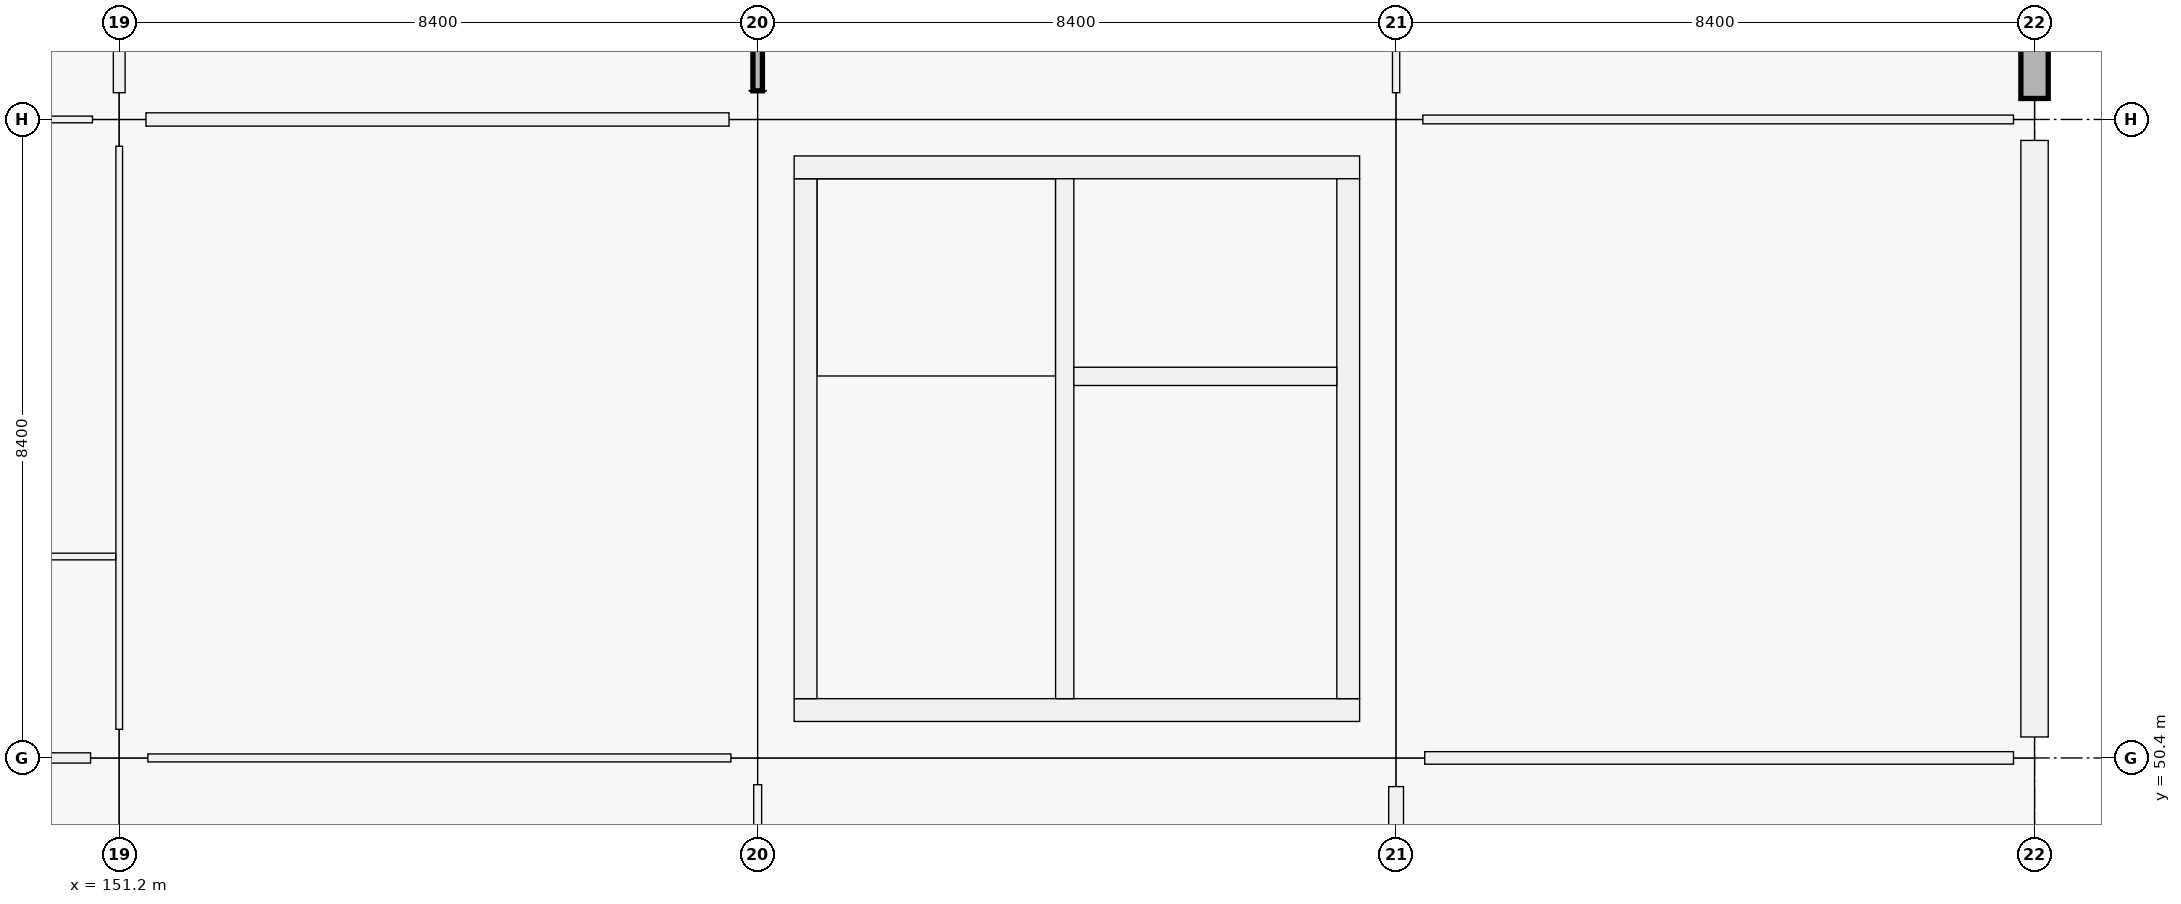
"""IFC4 building model, lengths in metres.
Left out: names, types, materials, properties, quantities, classifications, styles, units other than length and angle.
Written with IfcOpenShell. Run it as: python <this file> out.ifc"""

import sys

from ifc_helpers import new_model, si_unit, direction, frame, frame_2d, origin, origin_2d, place, context, subcontext, project, spatial, rectangle, extrude, element, fill, save


model = new_model("IFC4")
c1 = context("Model", 3, precision=1e-05, world=origin(), true_north=direction((0.0, 1.0)))
c2 = subcontext(c1, "Body", "Model", "MODEL_VIEW")
j1 = project(units=[si_unit("LENGTHUNIT", "METRE"), si_unit("PLANEANGLEUNIT", "RADIAN")], contexts=[c1])
p1 = place(None, origin())
s1 = spatial("IfcSite", under=j1, at=p1, CompositionType="ELEMENT")
p2 = place(p1, origin())
s2 = spatial("IfcBuilding", under=s1, at=p2, CompositionType="ELEMENT")
p3 = place(p2, frame((0.0, 0.0, 5.76)))
s3 = spatial("IfcBuildingStorey", under=s2, at=p3, CompositionType="ELEMENT", Elevation=5.76)
p4 = place(p3, frame((151.2, 50.4, 0.0), z_axis=(0.0, 0.0, 1.0), x_axis=(1.0, 0.0, 0.0)))
e1 = element("IfcColumn", 1, at=p4, inside=s3, PredefinedType="COLUMN", context=c2, shape_type="SweptSolid", body=[
    extrude(rectangle(XDim=0.75, YDim=0.75, at=origin_2d()), origin(), (0.0, 0.0, 1.0), 4.5),
])
for number, where, z_axis, x_axis in (
    (2, (151.2, 58.8, 0.0), (0.0, 0.0, 1.0), (1.0, 0.0, 0.0)),
    (3, (159.6, 50.4, 0.0), (0.0, 0.0, 1.0), (1.0, 0.0, 0.0)),
):
    element("IfcColumn", number, at=place(p3, frame(where, z_axis=z_axis, x_axis=x_axis)), inside=s3, PredefinedType="COLUMN", context=c2, shape_type="SweptSolid", body=[
        extrude(rectangle(XDim=0.7, YDim=0.7, at=origin_2d()), origin(), (0.0, 0.0, 1.0), 4.5),
    ])
for number, where, z_axis, x_axis in (
    (4, (159.6, 58.8, 0.0), (0.0, 0.0, 1.0), (1.0, 0.0, 0.0)),
    (5, (168.0, 50.4, 0.0), (0.0, 0.0, 1.0), (1.0, 0.0, 0.0)),
):
    element("IfcColumn", number, at=place(p3, frame(where, z_axis=z_axis, x_axis=x_axis)), inside=s3, PredefinedType="COLUMN", context=c2, shape_type="SweptSolid", body=[
        extrude(rectangle(XDim=0.75, YDim=0.75, at=origin_2d()), origin(), (0.0, 0.0, 1.0), 4.5),
    ])
p5 = place(p3, frame((168.0, 58.8, 0.0), z_axis=(0.0, 0.0, 1.0), x_axis=(1.0, 0.0, 0.0)))
e6 = element("IfcColumn", 6, at=p5, inside=s3, PredefinedType="COLUMN", context=c2, shape_type="SweptSolid", body=[
    extrude(rectangle(XDim=0.7, YDim=0.7, at=origin_2d()), origin(), (0.0, 0.0, 1.0), 4.5),
])
for number, where, z_axis, x_axis in (
    (7, (176.4, 50.4, 0.0), (0.0, 0.0, 1.0), (1.0, 0.0, 0.0)),
    (8, (176.4, 58.8, 0.0), (0.0, 0.0, 1.0), (1.0, 0.0, 0.0)),
):
    element("IfcColumn", number, at=place(p3, frame(where, z_axis=z_axis, x_axis=x_axis)), inside=s3, PredefinedType="COLUMN", context=c2, shape_type="SweptSolid", body=[
        extrude(rectangle(XDim=0.55, YDim=0.55, at=origin_2d()), origin(), (0.0, 0.0, 1.0), 4.2),
    ])
p6 = place(p3, frame((176.4, 58.524, 0.0), z_axis=(0.0, 0.0, 1.0), x_axis=(0.0, -1.0, 0.0)))
e9 = element("IfcWall", 9, at=p6, inside=s3, PredefinedType="SOLIDWALL", context=c2, shape_type="SweptSolid", body=[
    extrude(rectangle(XDim=7.848, YDim=0.36, at=frame_2d((3.924, 0.0))), origin(), (0.0, 0.0, 1.0), 3.4),
])
p7 = place(p6, frame((2.749, 0.0, 0.9)))
e10 = element("IfcOpeningElement", 10, at=p7, cuts=e9, PredefinedType="OPENING", context=c2, shape_type="SweptSolid", body=[
    extrude(rectangle(XDim=2.35, YDim=1.6, at=frame_2d((1.175, 0.8))), frame((0.0, 0.18, 0.0), z_axis=(0.0, -1.0, 0.0), x_axis=(1.0, 0.0, 0.0)), (0.0, 0.0, 1.0), 0.36),
])
p8 = place(p3, frame((176.4, 66.924, 0.0), z_axis=(0.0, 0.0, 1.0), x_axis=(0.0, -1.0, 0.0)))
e11 = element("IfcWall", 11, at=p8, inside=s3, PredefinedType="SOLIDWALL", context=c2, shape_type="SweptSolid", body=[
    extrude(rectangle(XDim=7.848, YDim=0.36, at=frame_2d((3.924, 0.0))), origin(), (0.0, 0.0, 1.0), 3.4),
])
p9 = place(p8, frame((2.549, 0.0, 0.9)))
e12 = element("IfcOpeningElement", 12, at=p9, cuts=e11, PredefinedType="OPENING", context=c2, shape_type="SweptSolid", body=[
    extrude(rectangle(XDim=2.75, YDim=1.6, at=frame_2d((1.375, 0.8))), frame((0.0, 0.18, 0.0), z_axis=(0.0, -1.0, 0.0), x_axis=(1.0, 0.0, 0.0)), (0.0, 0.0, 1.0), 0.36),
])
p10 = place(p3, frame((167.52, 51.03, 0.0), z_axis=(0.0, 0.0, 1.0), x_axis=(-1.0, 0.0, 0.0)))
e13 = element("IfcWall", 13, at=p10, inside=s3, PredefinedType="SHEAR", context=c2, shape_type="SweptSolid", body=[
    extrude(rectangle(XDim=7.44, YDim=0.3, at=frame_2d((3.72, 0.0))), origin(), (0.0, 0.0, 1.0), 4.5),
])
p11 = place(p10, frame((1.28, 0.0, 0.0)))
e14 = element("IfcOpeningElement", 14, at=p11, cuts=e13, PredefinedType="OPENING", context=c2, shape_type="SweptSolid", body=[
    extrude(rectangle(XDim=1.5, YDim=2.15, at=frame_2d((0.75, 1.075))), frame((0.0, 0.15, 0.0), z_axis=(0.0, -1.0, 0.0), x_axis=(1.0, 0.0, 0.0)), (0.0, 0.0, 1.0), 0.3),
])
p12 = place(p3, frame((160.23, 51.18, 0.0), z_axis=(0.0, 0.0, 1.0), x_axis=(0.0, 1.0, 0.0)))
e15 = element("IfcWall", 15, at=p12, inside=s3, PredefinedType="SHEAR", context=c2, shape_type="SweptSolid", body=[
    extrude(rectangle(XDim=6.84, YDim=0.3, at=frame_2d((3.42, 0.0))), origin(), (0.0, 0.0, 1.0), 4.5),
])
p13 = place(p3, frame((160.08, 58.17, 0.0), z_axis=(0.0, 0.0, 1.0), x_axis=(1.0, 0.0, 0.0)))
e16 = element("IfcWall", 16, at=p13, inside=s3, PredefinedType="SHEAR", context=c2, shape_type="SweptSolid", body=[
    extrude(rectangle(XDim=7.44, YDim=0.3, at=frame_2d((3.72, 0.0))), origin(), (0.0, 0.0, 1.0), 4.5),
])
p14 = place(p3, frame((167.37, 58.02, 0.0), z_axis=(0.0, 0.0, 1.0), x_axis=(0.0, -1.0, 0.0)))
e17 = element("IfcWall", 17, at=p14, inside=s3, PredefinedType="SHEAR", context=c2, shape_type="SweptSolid", body=[
    extrude(rectangle(XDim=6.84, YDim=0.3, at=frame_2d((3.42, 0.0))), origin(), (0.0, 0.0, 1.0), 4.5),
])
p15 = place(p3, frame((163.64, 51.18, 0.0), z_axis=(0.0, 0.0, 1.0), x_axis=(0.0, 1.0, 0.0)))
e18 = element("IfcWall", 18, at=p15, inside=s3, PredefinedType="SHEAR", context=c2, shape_type="SweptSolid", body=[
    extrude(rectangle(XDim=6.84, YDim=0.24, at=frame_2d((3.42, 0.0))), origin(), (0.0, 0.0, 1.0), 4.5),
])
p16 = place(p15, frame((0.12, 0.0, 0.0)))
e19 = element("IfcOpeningElement", 19, at=p16, cuts=e18, PredefinedType="OPENING", context=c2, shape_type="SweptSolid", body=[
    extrude(rectangle(XDim=1.0, YDim=2.15, at=frame_2d((0.5, 1.075))), frame((0.0, 0.12, 0.0), z_axis=(0.0, -1.0, 0.0), x_axis=(1.0, 0.0, 0.0)), (0.0, 0.0, 1.0), 0.24),
])
p17 = place(p3, frame((163.76, 55.42, 0.0), z_axis=(0.0, 0.0, 1.0), x_axis=(1.0, 0.0, 0.0)))
e20 = element("IfcWall", 20, at=p17, inside=s3, PredefinedType="SHEAR", context=c2, shape_type="SweptSolid", body=[
    extrude(rectangle(XDim=3.46, YDim=0.24, at=frame_2d((1.73, 0.0))), origin(), (0.0, 0.0, 1.0), 4.5),
])
p18 = place(p17, frame((1.08, 0.0, 0.0)))
e21 = element("IfcOpeningElement", 21, at=p18, cuts=e20, PredefinedType="OPENING", context=c2, shape_type="SweptSolid", body=[
    extrude(rectangle(XDim=1.3, YDim=2.25, at=frame_2d((0.65, 1.125))), frame((0.0, 0.12, 0.0), z_axis=(0.0, -1.0, 0.0), x_axis=(1.0, 0.0, 0.0)), (0.0, 0.0, 1.0), 0.24),
])
p19 = place(p3, frame((143.152, 50.4, 0.0), z_axis=(0.0, 0.0, 1.0), x_axis=(1.0, 0.0, 0.0)))
e22 = element("IfcWall", 22, at=p19, inside=s3, PredefinedType="PARTITIONING", context=c2, shape_type="SweptSolid", body=[
    extrude(rectangle(XDim=7.671, YDim=0.135, at=frame_2d((3.835, 0.0))), origin(), (0.0, 0.0, 1.0), 2.4),
])
p20 = place(p3, frame((143.177, 58.8, 0.0), z_axis=(0.0, 0.0, 1.0), x_axis=(1.0, 0.0, 0.0)))
e23 = element("IfcWall", 23, at=p20, inside=s3, PredefinedType="PARTITIONING", context=c2, shape_type="SweptSolid", body=[
    extrude(rectangle(XDim=7.671, YDim=0.088, at=frame_2d((3.835, 0.0))), origin(), (0.0, 0.0, 1.0), 2.4),
])
p21 = place(p3, frame((151.577, 50.4, 0.0), z_axis=(0.0, 0.0, 1.0), x_axis=(1.0, 0.0, 0.0)))
e24 = element("IfcWall", 24, at=p21, inside=s3, PredefinedType="PARTITIONING", context=c2, shape_type="SweptSolid", body=[
    extrude(rectangle(XDim=7.671, YDim=0.105, at=frame_2d((3.835, 0.0))), origin(), (0.0, 0.0, 1.0), 2.4),
])
p22 = place(p21, frame((3.365, 0.0, 0.0)))
e25 = element("IfcOpeningElement", 25, at=p22, cuts=e24, PredefinedType="OPENING", context=c2, shape_type="SweptSolid", body=[
    extrude(rectangle(XDim=0.94, YDim=2.15, at=frame_2d((0.47, 1.075))), frame((0.0, 0.052, 0.0), z_axis=(0.0, -1.0, 0.0), x_axis=(1.0, 0.0, 0.0)), (0.0, 0.0, 1.0), 0.105),
])
p23 = place(p3, frame((151.552, 58.8, 0.0), z_axis=(0.0, 0.0, 1.0), x_axis=(1.0, 0.0, 0.0)))
e26 = element("IfcWall", 26, at=p23, inside=s3, PredefinedType="PARTITIONING", context=c2, shape_type="SweptSolid", body=[
    extrude(rectangle(XDim=7.671, YDim=0.175, at=frame_2d((3.835, 0.0))), origin(), (0.0, 0.0, 1.0), 2.4),
])
p24 = place(p23, frame((3.376, 0.0, 0.0)))
e27 = element("IfcOpeningElement", 27, at=p24, cuts=e26, PredefinedType="OPENING", context=c2, shape_type="SweptSolid", body=[
    extrude(rectangle(XDim=0.92, YDim=2.15, at=frame_2d((0.46, 1.075))), frame((0.0, 0.087, 0.0), z_axis=(0.0, -1.0, 0.0), x_axis=(1.0, 0.0, 0.0)), (0.0, 0.0, 1.0), 0.175),
])
p25 = place(p3, frame((168.377, 50.4, 0.0), z_axis=(0.0, 0.0, 1.0), x_axis=(1.0, 0.0, 0.0)))
e28 = element("IfcWall", 28, at=p25, inside=s3, PredefinedType="PARTITIONING", context=c2, shape_type="SweptSolid", body=[
    extrude(rectangle(XDim=7.746, YDim=0.165, at=frame_2d((3.873, 0.0))), origin(), (0.0, 0.0, 1.0), 2.4),
])
p26 = place(p25, frame((3.363, 0.0, 0.0)))
e29 = element("IfcOpeningElement", 29, at=p26, cuts=e28, PredefinedType="OPENING", context=c2, shape_type="SweptSolid", body=[
    extrude(rectangle(XDim=1.02, YDim=2.2, at=frame_2d((0.51, 1.1))), frame((0.0, 0.083, 0.0), z_axis=(0.0, -1.0, 0.0), x_axis=(1.0, 0.0, 0.0)), (0.0, 0.0, 1.0), 0.165),
])
p27 = place(p3, frame((168.352, 58.8, 0.0), z_axis=(0.0, 0.0, 1.0), x_axis=(1.0, 0.0, 0.0)))
e30 = element("IfcWall", 30, at=p27, inside=s3, PredefinedType="PARTITIONING", context=c2, shape_type="SweptSolid", body=[
    extrude(rectangle(XDim=7.771, YDim=0.115, at=frame_2d((3.885, 0.0))), origin(), (0.0, 0.0, 1.0), 2.4),
])
p28 = place(p27, frame((3.385, 0.0, 0.0)))
e31 = element("IfcOpeningElement", 31, at=p28, cuts=e30, PredefinedType="OPENING", context=c2, shape_type="SweptSolid", body=[
    extrude(rectangle(XDim=1.0, YDim=2.2, at=frame_2d((0.5, 1.1))), frame((0.0, 0.058, 0.0), z_axis=(0.0, -1.0, 0.0), x_axis=(1.0, 0.0, 0.0)), (0.0, 0.0, 1.0), 0.115),
])
p29 = place(p3, frame((151.2, 50.777, 0.0), z_axis=(0.0, 0.0, 1.0), x_axis=(0.0, 1.0, 0.0)))
e32 = element("IfcWall", 32, at=p29, inside=s3, PredefinedType="PARTITIONING", context=c2, shape_type="SweptSolid", body=[
    extrude(rectangle(XDim=7.671, YDim=0.088, at=frame_2d((3.835, 0.0))), origin(), (0.0, 0.0, 1.0), 2.4),
])
p30 = place(p3, frame((151.2, 59.152, 0.0), z_axis=(0.0, 0.0, 1.0), x_axis=(0.0, 1.0, 0.0)))
e33 = element("IfcWall", 33, at=p30, inside=s3, PredefinedType="PARTITIONING", context=c2, shape_type="SweptSolid", body=[
    extrude(rectangle(XDim=7.671, YDim=0.155, at=frame_2d((3.835, 0.0))), origin(), (0.0, 0.0, 1.0), 2.4),
])
p31 = place(p30, frame((3.331, 0.0, 0.0)))
e34 = element("IfcOpeningElement", 34, at=p31, cuts=e33, PredefinedType="OPENING", context=c2, shape_type="SweptSolid", body=[
    extrude(rectangle(XDim=1.01, YDim=2.12, at=frame_2d((0.505, 1.06))), frame((0.0, 0.078, 0.0), z_axis=(0.0, -1.0, 0.0), x_axis=(1.0, 0.0, 0.0)), (0.0, 0.0, 1.0), 0.155),
])
p32 = place(p3, frame((159.6, 42.377, 0.0), z_axis=(0.0, 0.0, 1.0), x_axis=(0.0, 1.0, 0.0)))
e35 = element("IfcWall", 35, at=p32, inside=s3, PredefinedType="PARTITIONING", context=c2, shape_type="SweptSolid", body=[
    extrude(rectangle(XDim=7.671, YDim=0.105, at=frame_2d((3.835, 0.0))), origin(), (0.0, 0.0, 1.0), 2.4),
])
p33 = place(p32, frame((3.311, 0.0, 0.0)))
e36 = element("IfcOpeningElement", 36, at=p33, cuts=e35, PredefinedType="OPENING", context=c2, shape_type="SweptSolid", body=[
    extrude(rectangle(XDim=1.05, YDim=2.12, at=frame_2d((0.525, 1.06))), frame((0.0, 0.052, 0.0), z_axis=(0.0, -1.0, 0.0), x_axis=(1.0, 0.0, 0.0)), (0.0, 0.0, 1.0), 0.105),
])
p34 = place(p3, frame((159.6, 59.177, 0.0), z_axis=(0.0, 0.0, 1.0), x_axis=(0.0, 1.0, 0.0)))
e37 = element("IfcWall", 37, at=p34, inside=s3, PredefinedType="PARTITIONING", context=c2, shape_type="SweptSolid", body=[
    extrude(rectangle(XDim=7.671, YDim=0.125, at=frame_2d((3.835, 0.0))), origin(), (0.0, 0.0, 1.0), 2.4),
])
p35 = place(p34, frame((3.331, 0.0, 0.0)))
e38 = element("IfcOpeningElement", 38, at=p35, cuts=e37, PredefinedType="OPENING", context=c2, shape_type="SweptSolid", body=[
    extrude(rectangle(XDim=1.01, YDim=2.12, at=frame_2d((0.505, 1.06))), frame((0.0, 0.062, 0.0), z_axis=(0.0, -1.0, 0.0), x_axis=(1.0, 0.0, 0.0)), (0.0, 0.0, 1.0), 0.125),
])
p36 = place(p3, frame((168.0, 42.352, 0.0), z_axis=(0.0, 0.0, 1.0), x_axis=(0.0, 1.0, 0.0)))
e39 = element("IfcWall", 39, at=p36, inside=s3, PredefinedType="PARTITIONING", context=c2, shape_type="SweptSolid", body=[
    extrude(rectangle(XDim=7.671, YDim=0.195, at=frame_2d((3.835, 0.0))), origin(), (0.0, 0.0, 1.0), 2.4),
])
p37 = place(p36, frame((3.371, 0.0, 0.0)))
e40 = element("IfcOpeningElement", 40, at=p37, cuts=e39, PredefinedType="OPENING", context=c2, shape_type="SweptSolid", body=[
    extrude(rectangle(XDim=0.93, YDim=2.12, at=frame_2d((0.465, 1.06))), frame((0.0, 0.098, 0.0), z_axis=(0.0, -1.0, 0.0), x_axis=(1.0, 0.0, 0.0)), (0.0, 0.0, 1.0), 0.195),
])
p38 = place(p3, frame((168.0, 59.152, 0.0), z_axis=(0.0, 0.0, 1.0), x_axis=(0.0, 1.0, 0.0)))
e41 = element("IfcWall", 41, at=p38, inside=s3, PredefinedType="PARTITIONING", context=c2, shape_type="SweptSolid", body=[
    extrude(rectangle(XDim=7.671, YDim=0.095, at=frame_2d((3.835, 0.0))), origin(), (0.0, 0.0, 1.0), 2.4),
])
p39 = place(p38, frame((3.365, 0.0, 0.0)))
e42 = element("IfcOpeningElement", 42, at=p39, cuts=e41, PredefinedType="OPENING", context=c2, shape_type="SweptSolid", body=[
    extrude(rectangle(XDim=0.94, YDim=2.15, at=frame_2d((0.47, 1.075))), frame((0.0, 0.047, 0.0), z_axis=(0.0, -1.0, 0.0), x_axis=(1.0, 0.0, 0.0)), (0.0, 0.0, 1.0), 0.095),
])
p40 = place(p3, frame((142.86, 53.05, 0.0), z_axis=(0.0, 0.0, 1.0), x_axis=(1.0, 0.0, 0.0)))
e43 = element("IfcWall", 43, at=p40, inside=s3, PredefinedType="PARTITIONING", context=c2, shape_type="SweptSolid", body=[
    extrude(rectangle(XDim=8.294, YDim=0.088, at=frame_2d((4.147, 0.0))), origin(), (0.0, 0.0, 1.0), 2.4),
])
p41 = place(p7, origin())
e44 = element("IfcWindow", 44, at=p41, inside=s3, PartitioningType="SINGLE_PANEL", PredefinedType="WINDOW", context=c2, shape_type="SweptSolid", body=[
    extrude(rectangle(XDim=2.35, YDim=1.6, at=frame_2d((1.175, 0.8))), frame((0.0, 0.03, 0.0), z_axis=(0.0, -1.0, 0.0), x_axis=(1.0, 0.0, 0.0)), (0.0, 0.0, 1.0), 0.06),
])
fill(e10, e44)
p42 = place(p16, origin())
e45 = element("IfcDoor", 45, at=p42, inside=s3, OperationType="SINGLE_SWING_LEFT", PredefinedType="DOOR", context=c2, shape_type="SweptSolid", body=[
    extrude(rectangle(XDim=1.0, YDim=2.15, at=frame_2d((0.5, 1.075))), frame((0.0, 0.025, 0.0), z_axis=(0.0, -1.0, 0.0), x_axis=(1.0, 0.0, 0.0)), (0.0, 0.0, 1.0), 0.05),
])
fill(e19, e45)
p43 = place(p11, origin())
e46 = element("IfcDoor", 46, at=p43, inside=s3, OperationType="DOUBLE_DOOR_SINGLE_SWING", PredefinedType="DOOR", context=c2, shape_type="SweptSolid", body=[
    extrude(rectangle(XDim=1.5, YDim=2.15, at=frame_2d((0.75, 1.075))), frame((0.0, 0.025, 0.0), z_axis=(0.0, -1.0, 0.0), x_axis=(1.0, 0.0, 0.0)), (0.0, 0.0, 1.0), 0.05),
])
fill(e14, e46)
p44 = place(p18, origin())
e47 = element("IfcDoor", 47, at=p44, inside=s3, OperationType="DOUBLE_DOOR_SLIDING", PredefinedType="DOOR", context=c2, shape_type="SweptSolid", body=[
    extrude(rectangle(XDim=1.3, YDim=2.25, at=frame_2d((0.65, 1.125))), frame((0.0, 0.025, 0.0), z_axis=(0.0, -1.0, 0.0), x_axis=(1.0, 0.0, 0.0)), (0.0, 0.0, 1.0), 0.05),
])
fill(e21, e47)
p45 = place(p22, origin())
e48 = element("IfcDoor", 48, at=p45, inside=s3, OperationType="SINGLE_SWING_LEFT", PredefinedType="DOOR", context=c2, shape_type="SweptSolid", body=[
    extrude(rectangle(XDim=0.94, YDim=2.15, at=frame_2d((0.47, 1.075))), frame((0.0, 0.025, 0.0), z_axis=(0.0, -1.0, 0.0), x_axis=(1.0, 0.0, 0.0)), (0.0, 0.0, 1.0), 0.05),
])
fill(e25, e48)
p46 = place(p24, origin())
e49 = element("IfcDoor", 49, at=p46, inside=s3, OperationType="SINGLE_SWING_RIGHT", PredefinedType="DOOR", context=c2, shape_type="SweptSolid", body=[
    extrude(rectangle(XDim=0.92, YDim=2.15, at=frame_2d((0.46, 1.075))), frame((0.0, 0.025, 0.0), z_axis=(0.0, -1.0, 0.0), x_axis=(1.0, 0.0, 0.0)), (0.0, 0.0, 1.0), 0.05),
])
fill(e27, e49)
p47 = place(p26, origin())
e50 = element("IfcDoor", 50, at=p47, inside=s3, OperationType="SINGLE_SWING_RIGHT", PredefinedType="DOOR", context=c2, shape_type="SweptSolid", body=[
    extrude(rectangle(XDim=1.02, YDim=2.2, at=frame_2d((0.51, 1.1))), frame((0.0, 0.025, 0.0), z_axis=(0.0, -1.0, 0.0), x_axis=(1.0, 0.0, 0.0)), (0.0, 0.0, 1.0), 0.05),
])
fill(e29, e50)
p48 = place(p28, origin())
e51 = element("IfcDoor", 51, at=p48, inside=s3, OperationType="SINGLE_SWING_LEFT", PredefinedType="DOOR", context=c2, shape_type="SweptSolid", body=[
    extrude(rectangle(XDim=1.0, YDim=2.2, at=frame_2d((0.5, 1.1))), frame((0.0, 0.025, 0.0), z_axis=(0.0, -1.0, 0.0), x_axis=(1.0, 0.0, 0.0)), (0.0, 0.0, 1.0), 0.05),
])
fill(e31, e51)
save(model, sys.argv[1])
